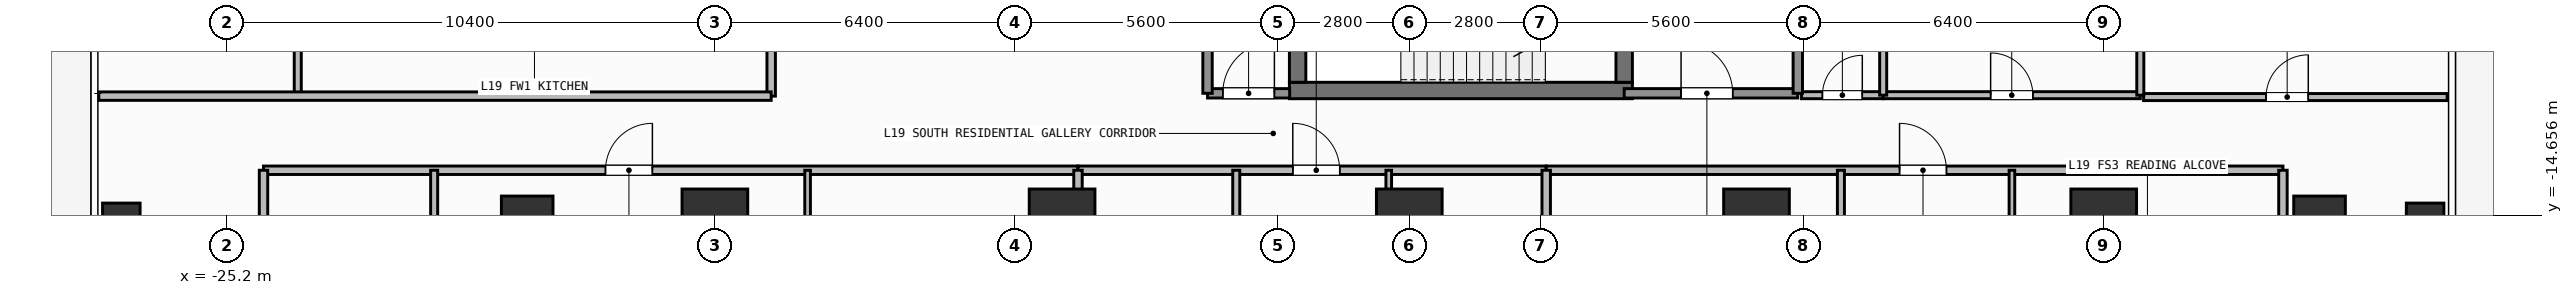
"""IFC4 building model, lengths in metres.
Left out: names, types, materials, properties, quantities, classifications, styles, units other than length and angle.
Written with IfcOpenShell. Run it as: python <this file> out.ifc"""

import sys

from ifc_helpers import new_model, si_unit, direction, frame, frame_2d, origin, origin_2d, place, context, subcontext, project, spatial, rectangle, hollow_rectangle, extrude, element, fill, save


model = new_model("IFC4")
c1 = context("Model", 3, precision=1e-05, world=origin(), true_north=direction((0.0, 1.0)))
c2 = subcontext(c1, "Body", "Model", "MODEL_VIEW")
j1 = project(units=[si_unit("LENGTHUNIT", "METRE"), si_unit("PLANEANGLEUNIT", "RADIAN")], contexts=[c1])
p1 = place(None, origin())
s1 = spatial("IfcSite", under=j1, at=p1, CompositionType="ELEMENT")
p2 = place(p1, origin())
s2 = spatial("IfcBuilding", under=s1, at=p2, CompositionType="ELEMENT")
p3 = place(p2, frame((0.0, 0.0, 73.5)))
s3 = spatial("IfcBuildingStorey", under=s2, at=p3, CompositionType="ELEMENT", Elevation=73.5)
p4 = place(p3, frame((-2.555, -12.0, 0.0), z_axis=(0.0, 0.0, 1.0), x_axis=(1.0, 0.0, 0.0)))
e1 = element("IfcWall", 1, at=p4, inside=s3, PredefinedType="SHEAR", context=c2, shape_type="SweptSolid", body=[
    extrude(rectangle(XDim=7.31, YDim=0.35, at=frame_2d((3.655, 0.0))), origin(), (0.0, 0.0, 1.0), 3.9),
])
p5 = place(p3, frame((-2.38, -11.825, 0.0), z_axis=(0.0, 0.0, 1.0), x_axis=(0.0, 1.0, 0.0)))
e2 = element("IfcWall", 2, at=p5, inside=s3, PredefinedType="SHEAR", context=c2, shape_type="SweptSolid", body=[
    extrude(rectangle(XDim=2.925, YDim=0.35, at=frame_2d((1.462, 0.0))), origin(), (0.0, 0.0, 1.0), 3.9),
])
p6 = place(p3, frame((4.58, -8.9, 0.0), z_axis=(0.0, 0.0, 1.0), x_axis=(0.0, -1.0, 0.0)))
e3 = element("IfcWall", 3, at=p6, inside=s3, PredefinedType="SHEAR", context=c2, shape_type="SweptSolid", body=[
    extrude(rectangle(XDim=2.925, YDim=0.35, at=frame_2d((1.462, 0.0))), origin(), (0.0, 0.0, 1.0), 3.9),
])
p7 = place(p6, frame((0.913, 0.0, 0.0)))
e4 = element("IfcOpeningElement", 4, at=p7, cuts=e3, PredefinedType="OPENING", context=c2, shape_type="SweptSolid", body=[
    extrude(rectangle(XDim=1.1, YDim=2.15, at=frame_2d((0.55, 1.075))), frame((0.0, 0.185, 0.0), z_axis=(0.0, -1.0, 0.0), x_axis=(1.0, 0.0, 0.0)), (0.0, 0.0, 1.0), 0.37),
])
for number, where, z_axis, x_axis in (
    (5, (-14.8, -14.8, 0.0), (0.0, 0.0, 1.0), (1.0, 0.0, 0.0)),
    (6, (-7.4, -14.8, 0.0), (0.0, 0.0, 1.0), (1.0, 0.0, 0.0)),
    (7, (0.0, -14.8, 0.0), (0.0, 0.0, 1.0), (1.0, 0.0, 0.0)),
    (8, (7.4, -14.8, 0.0), (0.0, 0.0, 1.0), (1.0, 0.0, 0.0)),
    (9, (14.8, -14.8, 0.0), (0.0, 0.0, 1.0), (1.0, 0.0, 0.0)),
):
    element("IfcColumn", number, at=place(p3, frame(where, z_axis=z_axis, x_axis=x_axis)), inside=s3, PredefinedType="COLUMN", context=c2, shape_type="SweptSolid", body=[
        extrude(rectangle(XDim=1.4, YDim=1.4, at=origin_2d()), origin(), (0.0, 0.0, 1.0), 3.9),
    ])
for number, where, z_axis, x_axis in (
    (10, (-18.8, -14.8, 0.0), (0.0, 0.0, 1.0), (1.0, 0.0, 0.0)),
    (11, (19.4, -14.8, 0.0), (0.0, 0.0, 1.0), (1.0, 0.0, 0.0)),
):
    element("IfcColumn", number, at=place(p3, frame(where, z_axis=z_axis, x_axis=x_axis)), inside=s3, PredefinedType="COLUMN", context=c2, shape_type="SweptSolid", body=[
        extrude(rectangle(XDim=1.1, YDim=1.1, at=origin_2d()), origin(), (0.0, 0.0, 1.0), 3.9),
    ])
for number, where, z_axis, x_axis in (
    (12, (-27.45, -14.8, 0.0), (0.0, 0.0, 1.0), (1.0, 0.0, 0.0)),
    (13, (21.65, -14.8, 0.0), (0.0, 0.0, 1.0), (1.0, 0.0, 0.0)),
):
    element("IfcColumn", number, at=place(p3, frame(where, z_axis=z_axis, x_axis=x_axis)), inside=s3, PredefinedType="COLUMN", context=c2, shape_type="SweptSolid", body=[
        extrude(hollow_rectangle(XDim=0.8, YDim=0.8, WallThickness=0.036, at=origin_2d()), origin(), (0.0, 0.0, 1.0), 3.9),
    ])
p8 = place(p3, frame((4.58, -12.06, 0.0), z_axis=(0.0, 0.0, 1.0), x_axis=(1.0, 0.0, 0.0)))
e14 = element("IfcWall", 14, at=p8, inside=s3, PredefinedType="SOLIDWALL", context=c2, shape_type="SweptSolid", body=[
    extrude(rectangle(XDim=3.7, YDim=0.2, at=frame_2d((1.85, 0.0))), origin(), (0.0, 0.0, 1.0), 3.6),
])
p9 = place(p8, frame((1.212, 0.0, 0.0)))
e15 = element("IfcOpeningElement", 15, at=p9, cuts=e14, PredefinedType="OPENING", context=c2, shape_type="SweptSolid", body=[
    extrude(rectangle(XDim=1.1, YDim=2.15, at=frame_2d((0.55, 1.075))), frame((0.0, 0.11, 0.0), z_axis=(0.0, -1.0, 0.0), x_axis=(1.0, 0.0, 0.0)), (0.0, 0.0, 1.0), 0.22),
])
p10 = place(p3, frame((-4.3, -12.06, 0.0), z_axis=(0.0, 0.0, 1.0), x_axis=(1.0, 0.0, 0.0)))
e16 = element("IfcWall", 16, at=p10, inside=s3, PredefinedType="SOLIDWALL", context=c2, shape_type="SweptSolid", body=[
    extrude(rectangle(XDim=1.75, YDim=0.2, at=frame_2d((0.875, 0.0))), origin(), (0.0, 0.0, 1.0), 3.6),
])
p11 = place(p10, frame((0.325, 0.0, 0.0)))
e17 = element("IfcOpeningElement", 17, at=p11, cuts=e16, PredefinedType="OPENING", context=c2, shape_type="SweptSolid", body=[
    extrude(rectangle(XDim=1.1, YDim=2.15, at=frame_2d((0.55, 1.075))), frame((0.0, 0.11, 0.0), z_axis=(0.0, -1.0, 0.0), x_axis=(1.0, 0.0, 0.0)), (0.0, 0.0, 1.0), 0.22),
])
p12 = place(p3, frame((8.36, -12.1, 0.0), z_axis=(0.0, 0.0, 1.0), x_axis=(1.0, 0.0, 0.0)))
e18 = element("IfcWall", 18, at=p12, inside=s3, PredefinedType="PARTITIONING", context=c2, shape_type="SweptSolid", body=[
    extrude(rectangle(XDim=1.74, YDim=0.15, at=frame_2d((0.87, 0.0))), origin(), (0.0, 0.0, 1.0), 3.6),
])
p13 = place(p12, frame((0.445, 0.0, 0.0)))
e19 = element("IfcOpeningElement", 19, at=p13, cuts=e18, PredefinedType="OPENING", context=c2, shape_type="SweptSolid", body=[
    extrude(rectangle(XDim=0.85, YDim=2.1, at=frame_2d((0.425, 1.05))), frame((0.0, 0.085, 0.0), z_axis=(0.0, -1.0, 0.0), x_axis=(1.0, 0.0, 0.0)), (0.0, 0.0, 1.0), 0.17),
])
p14 = place(p3, frame((10.1, -12.1, 0.0), z_axis=(0.0, 0.0, 1.0), x_axis=(1.0, 0.0, 0.0)))
e20 = element("IfcWall", 20, at=p14, inside=s3, PredefinedType="PARTITIONING", context=c2, shape_type="SweptSolid", body=[
    extrude(rectangle(XDim=5.48, YDim=0.15, at=frame_2d((2.74, 0.0))), origin(), (0.0, 0.0, 1.0), 3.6),
])
p15 = place(p14, frame((2.29, 0.0, 0.0)))
e21 = element("IfcOpeningElement", 21, at=p15, cuts=e20, PredefinedType="OPENING", context=c2, shape_type="SweptSolid", body=[
    extrude(rectangle(XDim=0.9, YDim=2.1, at=frame_2d((0.45, 1.05))), frame((0.0, 0.085, 0.0), z_axis=(0.0, -1.0, 0.0), x_axis=(1.0, 0.0, 0.0)), (0.0, 0.0, 1.0), 0.17),
])
p16 = place(p3, frame((-24.42, -13.7, 0.0), z_axis=(0.0, 0.0, 1.0), x_axis=(1.0, 0.0, 0.0)))
e22 = element("IfcWall", 22, at=p16, inside=s3, PredefinedType="PARTITIONING", context=c2, shape_type="SweptSolid", body=[
    extrude(rectangle(XDim=17.359, YDim=0.18, at=frame_2d((8.679, 0.0))), origin(), (0.0, 0.0, 1.0), 3.6),
])
p17 = place(p16, frame((7.288, 0.0, 0.0)))
e23 = element("IfcOpeningElement", 23, at=p17, cuts=e22, PredefinedType="OPENING", context=c2, shape_type="SweptSolid", body=[
    extrude(rectangle(XDim=1.0, YDim=2.2, at=frame_2d((0.5, 1.1))), frame((0.0, 0.1, 0.0), z_axis=(0.0, -1.0, 0.0), x_axis=(1.0, 0.0, 0.0)), (0.0, 0.0, 1.0), 0.2),
])
p18 = place(p3, frame((-20.783, -20.79, 0.0), z_axis=(0.0, 0.0, 1.0), x_axis=(0.0, 1.0, 0.0)))
e24 = element("IfcWall", 24, at=p18, inside=s3, PredefinedType="PARTITIONING", context=c2, shape_type="SweptSolid", body=[
    extrude(rectangle(XDim=7.09, YDim=0.15, at=frame_2d((3.545, 0.0))), origin(), (0.0, 0.0, 1.0), 3.6),
])
p19 = place(p18, frame((3.03, 0.0, 0.0)))
e25 = element("IfcOpeningElement", 25, at=p19, cuts=e24, PredefinedType="OPENING", context=c2, shape_type="SweptSolid", body=[
    extrude(rectangle(XDim=0.85, YDim=2.1, at=frame_2d((0.425, 1.05))), frame((0.0, 0.085, 0.0), z_axis=(0.0, -1.0, 0.0), x_axis=(1.0, 0.0, 0.0)), (0.0, 0.0, 1.0), 0.17),
])
p20 = place(p3, frame((-12.824, -18.663, 0.0), z_axis=(0.0, 0.0, 1.0), x_axis=(0.0, 1.0, 0.0)))
e26 = element("IfcWall", 26, at=p20, inside=s3, PredefinedType="PARTITIONING", context=c2, shape_type="SweptSolid", body=[
    extrude(rectangle(XDim=4.963, YDim=0.12, at=frame_2d((2.481, 0.0))), origin(), (0.0, 0.0, 1.0), 3.6),
])
p21 = place(p20, frame((2.229, 0.0, 0.0)))
e27 = element("IfcOpeningElement", 27, at=p21, cuts=e26, PredefinedType="OPENING", context=c2, shape_type="SweptSolid", body=[
    extrude(rectangle(XDim=0.85, YDim=2.1, at=frame_2d((0.425, 1.05))), frame((0.0, 0.07, 0.0), z_axis=(0.0, -1.0, 0.0), x_axis=(1.0, 0.0, 0.0)), (0.0, 0.0, 1.0), 0.14),
])
p22 = place(p3, frame((-7.061, -13.7, 0.0), z_axis=(0.0, 0.0, 1.0), x_axis=(1.0, 0.0, 0.0)))
e28 = element("IfcWall", 28, at=p22, inside=s3, PredefinedType="PARTITIONING", context=c2, shape_type="SweptSolid", body=[
    extrude(rectangle(XDim=9.979, YDim=0.18, at=frame_2d((4.99, 0.0))), origin(), (0.0, 0.0, 1.0), 3.6),
])
p23 = place(p22, frame((4.578, 0.0, 0.0)))
e29 = element("IfcOpeningElement", 29, at=p23, cuts=e28, PredefinedType="OPENING", context=c2, shape_type="SweptSolid", body=[
    extrude(rectangle(XDim=1.0, YDim=2.2, at=frame_2d((0.5, 1.1))), frame((0.0, 0.1, 0.0), z_axis=(0.0, -1.0, 0.0), x_axis=(1.0, 0.0, 0.0)), (0.0, 0.0, 1.0), 0.2),
])
p24 = place(p3, frame((-3.688, -20.79, 0.0), z_axis=(0.0, 0.0, 1.0), x_axis=(0.0, 1.0, 0.0)))
e30 = element("IfcWall", 30, at=p24, inside=s3, PredefinedType="PARTITIONING", context=c2, shape_type="SweptSolid", body=[
    extrude(rectangle(XDim=7.09, YDim=0.15, at=frame_2d((3.545, 0.0))), origin(), (0.0, 0.0, 1.0), 3.6),
])
p25 = place(p24, frame((3.03, 0.0, 0.0)))
e31 = element("IfcOpeningElement", 31, at=p25, cuts=e30, PredefinedType="OPENING", context=c2, shape_type="SweptSolid", body=[
    extrude(rectangle(XDim=0.85, YDim=2.1, at=frame_2d((0.425, 1.05))), frame((0.0, 0.085, 0.0), z_axis=(0.0, -1.0, 0.0), x_axis=(1.0, 0.0, 0.0)), (0.0, 0.0, 1.0), 0.17),
])
p26 = place(p3, frame((-0.438, -18.082, 0.0), z_axis=(0.0, 0.0, 1.0), x_axis=(0.0, 1.0, 0.0)))
e32 = element("IfcWall", 32, at=p26, inside=s3, PredefinedType="PARTITIONING", context=c2, shape_type="SweptSolid", body=[
    extrude(rectangle(XDim=4.382, YDim=0.12, at=frame_2d((2.191, 0.0))), origin(), (0.0, 0.0, 1.0), 3.6),
])
p27 = place(p26, frame((1.588, 0.0, 0.0)))
e33 = element("IfcOpeningElement", 33, at=p27, cuts=e32, PredefinedType="OPENING", context=c2, shape_type="SweptSolid", body=[
    extrude(rectangle(XDim=0.85, YDim=2.1, at=frame_2d((0.425, 1.05))), frame((0.0, 0.07, 0.0), z_axis=(0.0, -1.0, 0.0), x_axis=(1.0, 0.0, 0.0)), (0.0, 0.0, 1.0), 0.14),
])
p28 = place(p3, frame((2.918, -13.7, 0.0), z_axis=(0.0, 0.0, 1.0), x_axis=(1.0, 0.0, 0.0)))
e34 = element("IfcWall", 34, at=p28, inside=s3, PredefinedType="PARTITIONING", context=c2, shape_type="SweptSolid", body=[
    extrude(rectangle(XDim=15.702, YDim=0.18, at=frame_2d((7.851, 0.0))), origin(), (0.0, 0.0, 1.0), 3.6),
])
p29 = place(p28, frame((7.531, 0.0, 0.0)))
e35 = element("IfcOpeningElement", 35, at=p29, cuts=e34, PredefinedType="OPENING", context=c2, shape_type="SweptSolid", body=[
    extrude(rectangle(XDim=1.0, YDim=2.2, at=frame_2d((0.5, 1.1))), frame((0.0, 0.1, 0.0), z_axis=(0.0, -1.0, 0.0), x_axis=(1.0, 0.0, 0.0)), (0.0, 0.0, 1.0), 0.2),
])
p30 = place(p3, frame((9.199, -20.79, 0.0), z_axis=(0.0, 0.0, 1.0), x_axis=(0.0, 1.0, 0.0)))
e36 = element("IfcWall", 36, at=p30, inside=s3, PredefinedType="PARTITIONING", context=c2, shape_type="SweptSolid", body=[
    extrude(rectangle(XDim=7.09, YDim=0.15, at=frame_2d((3.545, 0.0))), origin(), (0.0, 0.0, 1.0), 3.6),
])
p31 = place(p30, frame((2.133, 0.0, 0.0)))
e37 = element("IfcOpeningElement", 37, at=p31, cuts=e36, PredefinedType="OPENING", context=c2, shape_type="SweptSolid", body=[
    extrude(rectangle(XDim=0.85, YDim=2.1, at=frame_2d((0.425, 1.05))), frame((0.0, 0.085, 0.0), z_axis=(0.0, -1.0, 0.0), x_axis=(1.0, 0.0, 0.0)), (0.0, 0.0, 1.0), 0.17),
])
p32 = place(p3, frame((12.844, -17.1, 0.0), z_axis=(0.0, 0.0, 1.0), x_axis=(0.0, 1.0, 0.0)))
e38 = element("IfcWall", 38, at=p32, inside=s3, PredefinedType="PARTITIONING", context=c2, shape_type="SweptSolid", body=[
    extrude(rectangle(XDim=3.4, YDim=0.12, at=frame_2d((1.7, 0.0))), origin(), (0.0, 0.0, 1.0), 3.6),
])
p33 = place(p32, frame((0.675, 0.0, 0.0)))
e39 = element("IfcOpeningElement", 39, at=p33, cuts=e38, PredefinedType="OPENING", context=c2, shape_type="SweptSolid", body=[
    extrude(rectangle(XDim=0.85, YDim=2.1, at=frame_2d((0.425, 1.05))), frame((0.0, 0.07, 0.0), z_axis=(0.0, -1.0, 0.0), x_axis=(1.0, 0.0, 0.0)), (0.0, 0.0, 1.0), 0.14),
])
p34 = place(p3, frame((-13.6, -12.12, 0.0), z_axis=(0.0, 0.0, 1.0), x_axis=(0.0, 1.0, 0.0)))
e40 = element("IfcWall", 40, at=p34, inside=s3, PredefinedType="PARTITIONING", context=c2, shape_type="SweptSolid", body=[
    extrude(rectangle(XDim=11.247, YDim=0.18, at=frame_2d((5.624, 0.0))), origin(), (0.0, 0.0, 1.0), 3.6),
])
p35 = place(p34, frame((5.478, 0.0, 0.0)))
e41 = element("IfcOpeningElement", 41, at=p35, cuts=e40, PredefinedType="OPENING", context=c2, shape_type="SweptSolid", body=[
    extrude(rectangle(XDim=1.0, YDim=2.2, at=frame_2d((0.5, 1.1))), frame((0.0, 0.1, 0.0), z_axis=(0.0, -1.0, 0.0), x_axis=(1.0, 0.0, 0.0)), (0.0, 0.0, 1.0), 0.2),
])
p36 = place(p3, frame((15.65, -12.14, 0.0), z_axis=(0.0, 0.0, 1.0), x_axis=(1.0, 0.0, 0.0)))
e42 = element("IfcWall", 42, at=p36, inside=s3, PredefinedType="PARTITIONING", context=c2, shape_type="SweptSolid", body=[
    extrude(rectangle(XDim=6.47, YDim=0.15, at=frame_2d((3.235, 0.0))), origin(), (0.0, 0.0, 1.0), 3.6),
])
p37 = place(p36, frame((2.61, 0.0, 0.0)))
e43 = element("IfcOpeningElement", 43, at=p37, cuts=e42, PredefinedType="OPENING", context=c2, shape_type="SweptSolid", body=[
    extrude(rectangle(XDim=0.9, YDim=2.1, at=frame_2d((0.45, 1.05))), frame((0.0, 0.085, 0.0), z_axis=(0.0, -1.0, 0.0), x_axis=(1.0, 0.0, 0.0)), (0.0, 0.0, 1.0), 0.17),
])
for number, where, z_axis, x_axis in (
    (44, (8.28, -12.06, 0.0), (0.0, 0.0, 1.0), (0.0, 1.0, 0.0)),
    (45, (-4.3, -12.06, 0.0), (0.0, 0.0, 1.0), (0.0, 1.0, 0.0)),
):
    element("IfcWall", number, at=place(p3, frame(where, z_axis=z_axis, x_axis=x_axis)), inside=s3, PredefinedType="SOLIDWALL", context=c2, shape_type="SweptSolid", body=[
        extrude(rectangle(XDim=3.11, YDim=0.2, at=frame_2d((1.555, 0.0))), origin(), (0.0, 0.0, 1.0), 3.6),
    ])
p38 = place(p3, frame((10.1, -12.1, 0.0), z_axis=(0.0, 0.0, 1.0), x_axis=(0.0, 1.0, 0.0)))
e46 = element("IfcWall", 46, at=p38, inside=s3, PredefinedType="PARTITIONING", context=c2, shape_type="SweptSolid", body=[
    extrude(rectangle(XDim=2.35, YDim=0.15, at=frame_2d((1.175, 0.0))), origin(), (0.0, 0.0, 1.0), 3.6),
])
p39 = place(p3, frame((15.58, -12.1, 0.0), z_axis=(0.0, 0.0, 1.0), x_axis=(0.0, 1.0, 0.0)))
e47 = element("IfcWall", 47, at=p39, inside=s3, PredefinedType="PARTITIONING", context=c2, shape_type="SweptSolid", body=[
    extrude(rectangle(XDim=6.25, YDim=0.15, at=frame_2d((3.125, 0.0))), origin(), (0.0, 0.0, 1.0), 3.6),
])
for number, where, z_axis, x_axis in (
    (48, (-24.42, -23.91, 0.0), (0.0, 0.0, 1.0), (0.0, 1.0, 0.0)),
    (49, (18.62, -23.91, 0.0), (0.0, 0.0, 1.0), (0.0, 1.0, 0.0)),
):
    element("IfcWall", number, at=place(p3, frame(where, z_axis=z_axis, x_axis=x_axis)), inside=s3, PredefinedType="PARTITIONING", context=c2, shape_type="SweptSolid", body=[
        extrude(rectangle(XDim=10.21, YDim=0.18, at=frame_2d((5.105, 0.0))), origin(), (0.0, 0.0, 1.0), 3.6),
    ])
for number, where, z_axis, x_axis in (
    (50, (-7.061, -25.03, 0.0), (0.0, 0.0, 1.0), (0.0, 1.0, 0.0)),
    (51, (2.918, -25.03, 0.0), (0.0, 0.0, 1.0), (0.0, 1.0, 0.0)),
):
    element("IfcWall", number, at=place(p3, frame(where, z_axis=z_axis, x_axis=x_axis)), inside=s3, PredefinedType="PARTITIONING", context=c2, shape_type="SweptSolid", body=[
        extrude(rectangle(XDim=11.33, YDim=0.18, at=frame_2d((5.665, 0.0))), origin(), (0.0, 0.0, 1.0), 3.6),
    ])
p40 = place(p3, frame((-23.69, -12.12, 0.0), z_axis=(0.0, 0.0, 1.0), x_axis=(0.0, 1.0, 0.0)))
e52 = element("IfcWall", 52, at=p40, inside=s3, PredefinedType="PARTITIONING", context=c2, shape_type="SweptSolid", body=[
    extrude(rectangle(XDim=2.8, YDim=0.15, at=frame_2d((1.4, 0.0))), origin(), (0.0, 0.0, 1.0), 3.6),
])
p41 = place(p3, frame((-27.93, -12.12, 0.0), z_axis=(0.0, 0.0, 1.0), x_axis=(1.0, 0.0, 0.0)))
e53 = element("IfcWall", 53, at=p41, inside=s3, PredefinedType="PARTITIONING", context=c2, shape_type="SweptSolid", body=[
    extrude(rectangle(XDim=14.33, YDim=0.18, at=frame_2d((7.165, 0.0))), origin(), (0.0, 0.0, 1.0), 3.6),
])
p42 = place(p9, origin())
e54 = element("IfcDoor", 54, at=p42, inside=s3, OperationType="SINGLE_SWING_LEFT", PredefinedType="DOOR", context=c2, shape_type="SweptSolid", body=[
    extrude(rectangle(XDim=1.1, YDim=2.15, at=frame_2d((0.55, 1.075))), frame((0.0, 0.025, 0.0), z_axis=(0.0, -1.0, 0.0), x_axis=(1.0, 0.0, 0.0)), (0.0, 0.0, 1.0), 0.05),
])
fill(e15, e54)
p43 = place(p11, origin())
e55 = element("IfcDoor", 55, at=p43, inside=s3, OperationType="SINGLE_SWING_RIGHT", PredefinedType="DOOR", context=c2, shape_type="SweptSolid", body=[
    extrude(rectangle(XDim=1.1, YDim=2.15, at=frame_2d((0.55, 1.075))), frame((0.0, 0.025, 0.0), z_axis=(0.0, -1.0, 0.0), x_axis=(1.0, 0.0, 0.0)), (0.0, 0.0, 1.0), 0.05),
])
fill(e17, e55)
p44 = place(p13, origin())
e56 = element("IfcDoor", 56, at=p44, inside=s3, OperationType="SINGLE_SWING_RIGHT", PredefinedType="DOOR", context=c2, shape_type="SweptSolid", body=[
    extrude(rectangle(XDim=0.85, YDim=2.1, at=frame_2d((0.425, 1.05))), frame((0.0, 0.025, 0.0), z_axis=(0.0, -1.0, 0.0), x_axis=(1.0, 0.0, 0.0)), (0.0, 0.0, 1.0), 0.05),
])
fill(e19, e56)
p45 = place(p15, origin())
e57 = element("IfcDoor", 57, at=p45, inside=s3, OperationType="SINGLE_SWING_LEFT", PredefinedType="DOOR", context=c2, shape_type="SweptSolid", body=[
    extrude(rectangle(XDim=0.9, YDim=2.1, at=frame_2d((0.45, 1.05))), frame((0.0, 0.025, 0.0), z_axis=(0.0, -1.0, 0.0), x_axis=(1.0, 0.0, 0.0)), (0.0, 0.0, 1.0), 0.05),
])
fill(e21, e57)
p46 = place(p17, origin())
e58 = element("IfcDoor", 58, at=p46, inside=s3, OperationType="SINGLE_SWING_RIGHT", PredefinedType="DOOR", context=c2, shape_type="SweptSolid", body=[
    extrude(rectangle(XDim=1.0, YDim=2.2, at=frame_2d((0.5, 1.1))), frame((0.0, 0.025, 0.0), z_axis=(0.0, -1.0, 0.0), x_axis=(1.0, 0.0, 0.0)), (0.0, 0.0, 1.0), 0.05),
])
fill(e23, e58)
p47 = place(p23, origin())
e59 = element("IfcDoor", 59, at=p47, inside=s3, OperationType="SINGLE_SWING_LEFT", PredefinedType="DOOR", context=c2, shape_type="SweptSolid", body=[
    extrude(rectangle(XDim=1.0, YDim=2.2, at=frame_2d((0.5, 1.1))), frame((0.0, 0.025, 0.0), z_axis=(0.0, -1.0, 0.0), x_axis=(1.0, 0.0, 0.0)), (0.0, 0.0, 1.0), 0.05),
])
fill(e29, e59)
p48 = place(p29, origin())
e60 = element("IfcDoor", 60, at=p48, inside=s3, OperationType="SINGLE_SWING_LEFT", PredefinedType="DOOR", context=c2, shape_type="SweptSolid", body=[
    extrude(rectangle(XDim=1.0, YDim=2.2, at=frame_2d((0.5, 1.1))), frame((0.0, 0.025, 0.0), z_axis=(0.0, -1.0, 0.0), x_axis=(1.0, 0.0, 0.0)), (0.0, 0.0, 1.0), 0.05),
])
fill(e35, e60)
p49 = place(p37, origin())
e61 = element("IfcDoor", 61, at=p49, inside=s3, OperationType="SINGLE_SWING_RIGHT", PredefinedType="DOOR", context=c2, shape_type="SweptSolid", body=[
    extrude(rectangle(XDim=0.9, YDim=2.1, at=frame_2d((0.45, 1.05))), frame((0.0, 0.025, 0.0), z_axis=(0.0, -1.0, 0.0), x_axis=(1.0, 0.0, 0.0)), (0.0, 0.0, 1.0), 0.05),
])
fill(e43, e61)
save(model, sys.argv[1])
